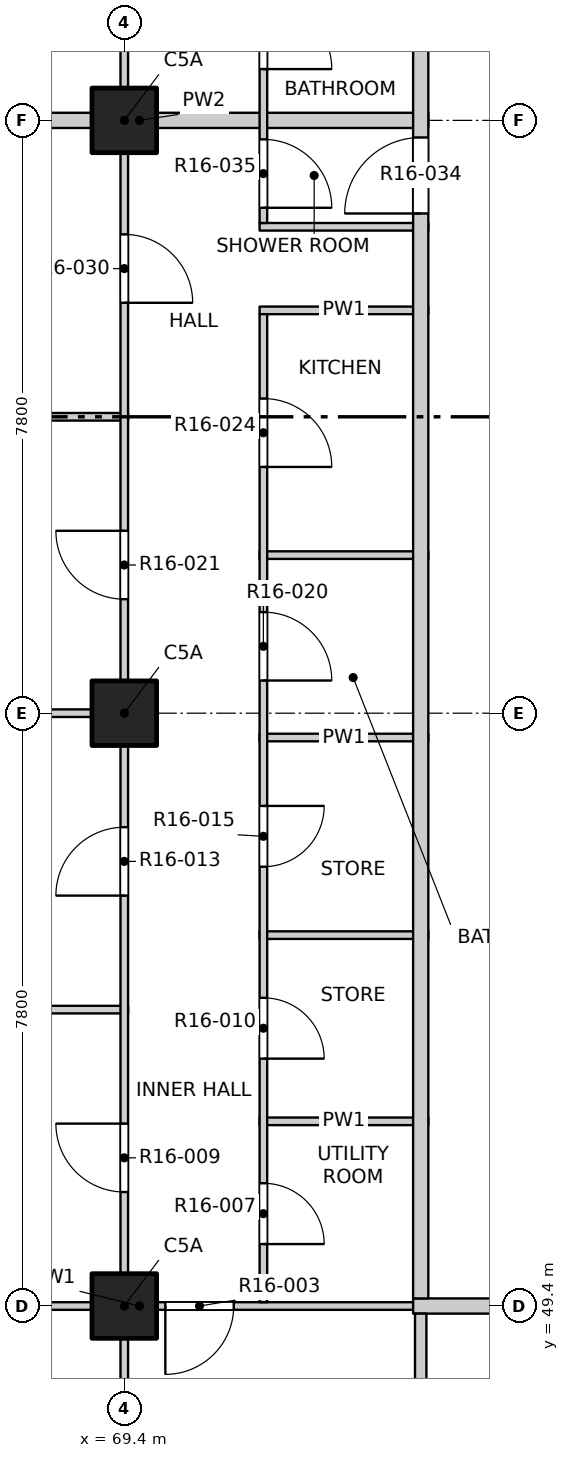
"""IFC4 building model, lengths in metres.
Left out: names, types, materials, properties, quantities, classifications, styles, units other than length and angle.
Written with IfcOpenShell. Run it as: python <this file> out.ifc"""

import sys

from ifc_helpers import new_model, si_unit, direction, frame, frame_2d, origin, origin_2d, place, context, subcontext, project, spatial, rectangle, extrude, element, fill, save


model = new_model("IFC4")
c1 = context("Model", 3, precision=1e-05, world=origin(), true_north=direction((0.0, 1.0)))
c2 = subcontext(c1, "Body", "Model", "MODEL_VIEW")
j1 = project(units=[si_unit("LENGTHUNIT", "METRE"), si_unit("PLANEANGLEUNIT", "RADIAN")], contexts=[c1])
p1 = place(None, origin())
s1 = spatial("IfcSite", under=j1, at=p1, CompositionType="ELEMENT")
p2 = place(p1, origin())
s2 = spatial("IfcBuilding", under=s1, at=p2, CompositionType="ELEMENT")
p3 = place(p2, frame((0.0, 0.0, 169.0)))
s3 = spatial("IfcBuildingStorey", under=s2, at=p3, CompositionType="ELEMENT", Elevation=169.0)
for number, where, z_axis, x_axis in (
    (1, (69.4, 49.4, -0.25), (0.0, 0.0, 1.0), (1.0, 0.0, 0.0)),
    (2, (69.4, 57.2, -0.25), (0.0, 0.0, 1.0), (1.0, 0.0, 0.0)),
    (3, (69.4, 65.0, -0.25), (0.0, 0.0, 1.0), (1.0, 0.0, 0.0)),
):
    element("IfcColumn", number, at=place(p3, frame(where, z_axis=z_axis, x_axis=x_axis)), inside=s3, PredefinedType="COLUMN", context=c2, shape_type="SweptSolid", body=[
        extrude(rectangle(XDim=0.85, YDim=0.85, at=origin_2d()), origin(), (0.0, 0.0, 1.0), 3.35),
    ])
p4 = place(p3, frame((65.8, 49.4, 0.0), z_axis=(0.0, 0.0, 1.0), x_axis=(1.0, 0.0, 0.0)))
e4 = element("IfcWall", 4, at=p4, inside=s3, PredefinedType="PARTITIONING", context=c2, shape_type="SweptSolid", body=[
    extrude(rectangle(XDim=7.6, YDim=0.1, at=frame_2d((3.8, 0.0))), origin(), (0.0, 0.0, 1.0), 3.1),
])
p5 = place(p4, frame((4.14, 0.0, 0.0)))
e5 = element("IfcOpeningElement", 5, at=p5, cuts=e4, PredefinedType="OPENING", context=c2, shape_type="SweptSolid", body=[
    extrude(rectangle(XDim=0.9, YDim=2.1, at=frame_2d((0.45, 1.05))), frame((0.0, 0.06, 0.0), z_axis=(0.0, -1.0, 0.0), x_axis=(1.0, 0.0, 0.0)), (0.0, 0.0, 1.0), 0.12),
])
p6 = place(p3, frame((73.2, 49.4, 0.0), z_axis=(0.0, 0.0, 1.0), x_axis=(1.0, 0.0, 0.0)))
e6 = element("IfcWall", 6, at=p6, inside=s3, PredefinedType="PARTITIONING", context=c2, shape_type="SweptSolid", body=[
    extrude(rectangle(XDim=23.6, YDim=0.2, at=frame_2d((11.8, 0.0))), origin(), (0.0, 0.0, 1.0), 3.1),
])
p7 = place(p6, frame((7.3, 0.0, 0.0)))
e7 = element("IfcOpeningElement", 7, at=p7, cuts=e6, PredefinedType="OPENING", context=c2, shape_type="SweptSolid", body=[
    extrude(rectangle(XDim=1.2, YDim=2.1, at=frame_2d((0.6, 1.05))), frame((0.0, 0.11, 0.0), z_axis=(0.0, -1.0, 0.0), x_axis=(1.0, 0.0, 0.0)), (0.0, 0.0, 1.0), 0.22),
])
p8 = place(p6, frame((20.125, 0.0, 0.0)))
e8 = element("IfcOpeningElement", 8, at=p8, cuts=e6, PredefinedType="OPENING", context=c2, shape_type="SweptSolid", body=[
    extrude(rectangle(XDim=1.2, YDim=2.1, at=frame_2d((0.6, 1.05))), frame((0.0, 0.11, 0.0), z_axis=(0.0, -1.0, 0.0), x_axis=(1.0, 0.0, 0.0)), (0.0, 0.0, 1.0), 0.22),
])
p9 = place(p3, frame((71.18, 51.83, 0.0), z_axis=(0.0, 0.0, 1.0), x_axis=(1.0, 0.0, 0.0)))
e9 = element("IfcWall", 9, at=p9, inside=s3, PredefinedType="PARTITIONING", context=c2, shape_type="SweptSolid", body=[
    extrude(rectangle(XDim=2.22, YDim=0.1, at=frame_2d((1.11, 0.0))), origin(), (0.0, 0.0, 1.0), 3.1),
])
p10 = place(p3, frame((65.8, 53.3, 0.0), z_axis=(0.0, 0.0, 1.0), x_axis=(1.0, 0.0, 0.0)))
e10 = element("IfcWall", 10, at=p10, inside=s3, PredefinedType="PARTITIONING", context=c2, shape_type="SweptSolid", body=[
    extrude(rectangle(XDim=3.65, YDim=0.1, at=frame_2d((1.825, 0.0))), origin(), (0.0, 0.0, 1.0), 3.1),
])
for number, where, z_axis, x_axis in (
    (11, (71.18, 54.28, 0.0), (0.0, 0.0, 1.0), (1.0, 0.0, 0.0)),
    (12, (71.18, 56.88, 0.0), (0.0, 0.0, 1.0), (1.0, 0.0, 0.0)),
):
    element("IfcWall", number, at=place(p3, frame(where, z_axis=z_axis, x_axis=x_axis)), inside=s3, PredefinedType="PARTITIONING", context=c2, shape_type="SweptSolid", body=[
        extrude(rectangle(XDim=2.22, YDim=0.1, at=frame_2d((1.11, 0.0))), origin(), (0.0, 0.0, 1.0), 3.1),
    ])
p11 = place(p3, frame((65.8, 57.2, 0.0), z_axis=(0.0, 0.0, 1.0), x_axis=(1.0, 0.0, 0.0)))
e13 = element("IfcWall", 13, at=p11, inside=s3, PredefinedType="PARTITIONING", context=c2, shape_type="SweptSolid", body=[
    extrude(rectangle(XDim=3.65, YDim=0.1, at=frame_2d((1.825, 0.0))), origin(), (0.0, 0.0, 1.0), 3.1),
])
p12 = place(p3, frame((71.18, 59.28, 0.0), z_axis=(0.0, 0.0, 1.0), x_axis=(1.0, 0.0, 0.0)))
e14 = element("IfcWall", 14, at=p12, inside=s3, PredefinedType="PARTITIONING", context=c2, shape_type="SweptSolid", body=[
    extrude(rectangle(XDim=2.22, YDim=0.1, at=frame_2d((1.11, 0.0))), origin(), (0.0, 0.0, 1.0), 3.1),
])
p13 = place(p3, frame((65.8, 61.1, 0.0), z_axis=(0.0, 0.0, 1.0), x_axis=(1.0, 0.0, 0.0)))
e15 = element("IfcWall", 15, at=p13, inside=s3, PredefinedType="PARTITIONING", context=c2, shape_type="SweptSolid", body=[
    extrude(rectangle(XDim=3.65, YDim=0.1, at=frame_2d((1.825, 0.0))), origin(), (0.0, 0.0, 1.0), 3.1),
])
for number, where, z_axis, x_axis in (
    (16, (71.18, 62.5, 0.0), (0.0, 0.0, 1.0), (1.0, 0.0, 0.0)),
    (17, (71.18, 63.6, 0.0), (0.0, 0.0, 1.0), (1.0, 0.0, 0.0)),
):
    element("IfcWall", number, at=place(p3, frame(where, z_axis=z_axis, x_axis=x_axis)), inside=s3, PredefinedType="PARTITIONING", context=c2, shape_type="SweptSolid", body=[
        extrude(rectangle(XDim=2.22, YDim=0.1, at=frame_2d((1.11, 0.0))), origin(), (0.0, 0.0, 1.0), 3.1),
    ])
p14 = place(p3, frame((65.8, 65.0, 0.0), z_axis=(0.0, 0.0, 1.0), x_axis=(1.0, 0.0, 0.0)))
e18 = element("IfcWall", 18, at=p14, inside=s3, PredefinedType="PARTITIONING", context=c2, shape_type="SweptSolid", body=[
    extrude(rectangle(XDim=7.6, YDim=0.2, at=frame_2d((3.8, 0.0))), origin(), (0.0, 0.0, 1.0), 3.1),
])
p15 = place(p3, frame((69.4, 45.8, 0.0), z_axis=(0.0, 0.0, 1.0), x_axis=(0.0, 1.0, 0.0)))
e19 = element("IfcWall", 19, at=p15, inside=s3, PredefinedType="PARTITIONING", context=c2, shape_type="SweptSolid", body=[
    extrude(rectangle(XDim=38.4, YDim=0.1, at=frame_2d((19.2, 0.0))), origin(), (0.0, 0.0, 1.0), 3.1),
])
p16 = place(p15, frame((1.05, 0.0, 0.0)))
e20 = element("IfcOpeningElement", 20, at=p16, cuts=e19, PredefinedType="OPENING", context=c2, shape_type="SweptSolid", body=[
    extrude(rectangle(XDim=1.2, YDim=2.1, at=frame_2d((0.6, 1.05))), frame((0.0, 0.06, 0.0), z_axis=(0.0, -1.0, 0.0), x_axis=(1.0, 0.0, 0.0)), (0.0, 0.0, 1.0), 0.12),
])
p17 = place(p15, frame((5.1, 0.0, 0.0)))
e21 = element("IfcOpeningElement", 21, at=p17, cuts=e19, PredefinedType="OPENING", context=c2, shape_type="SweptSolid", body=[
    extrude(rectangle(XDim=0.9, YDim=2.1, at=frame_2d((0.45, 1.05))), frame((0.0, 0.06, 0.0), z_axis=(0.0, -1.0, 0.0), x_axis=(1.0, 0.0, 0.0)), (0.0, 0.0, 1.0), 0.12),
])
p18 = place(p15, frame((9.0, 0.0, 0.0)))
e22 = element("IfcOpeningElement", 22, at=p18, cuts=e19, PredefinedType="OPENING", context=c2, shape_type="SweptSolid", body=[
    extrude(rectangle(XDim=0.9, YDim=2.1, at=frame_2d((0.45, 1.05))), frame((0.0, 0.06, 0.0), z_axis=(0.0, -1.0, 0.0), x_axis=(1.0, 0.0, 0.0)), (0.0, 0.0, 1.0), 0.12),
])
p19 = place(p15, frame((12.9, 0.0, 0.0)))
e23 = element("IfcOpeningElement", 23, at=p19, cuts=e19, PredefinedType="OPENING", context=c2, shape_type="SweptSolid", body=[
    extrude(rectangle(XDim=0.9, YDim=2.1, at=frame_2d((0.45, 1.05))), frame((0.0, 0.06, 0.0), z_axis=(0.0, -1.0, 0.0), x_axis=(1.0, 0.0, 0.0)), (0.0, 0.0, 1.0), 0.12),
])
p20 = place(p15, frame((16.8, 0.0, 0.0)))
e24 = element("IfcOpeningElement", 24, at=p20, cuts=e19, PredefinedType="OPENING", context=c2, shape_type="SweptSolid", body=[
    extrude(rectangle(XDim=0.9, YDim=2.1, at=frame_2d((0.45, 1.05))), frame((0.0, 0.06, 0.0), z_axis=(0.0, -1.0, 0.0), x_axis=(1.0, 0.0, 0.0)), (0.0, 0.0, 1.0), 0.12),
])
p21 = place(p15, frame((20.7, 0.0, 0.0)))
e25 = element("IfcOpeningElement", 25, at=p21, cuts=e19, PredefinedType="OPENING", context=c2, shape_type="SweptSolid", body=[
    extrude(rectangle(XDim=0.9, YDim=2.1, at=frame_2d((0.45, 1.05))), frame((0.0, 0.06, 0.0), z_axis=(0.0, -1.0, 0.0), x_axis=(1.0, 0.0, 0.0)), (0.0, 0.0, 1.0), 0.12),
])
p22 = place(p15, frame((24.6, 0.0, 0.0)))
e26 = element("IfcOpeningElement", 26, at=p22, cuts=e19, PredefinedType="OPENING", context=c2, shape_type="SweptSolid", body=[
    extrude(rectangle(XDim=0.9, YDim=2.1, at=frame_2d((0.45, 1.05))), frame((0.0, 0.06, 0.0), z_axis=(0.0, -1.0, 0.0), x_axis=(1.0, 0.0, 0.0)), (0.0, 0.0, 1.0), 0.12),
])
p23 = place(p15, frame((28.5, 0.0, 0.0)))
e27 = element("IfcOpeningElement", 27, at=p23, cuts=e19, PredefinedType="OPENING", context=c2, shape_type="SweptSolid", body=[
    extrude(rectangle(XDim=0.9, YDim=2.1, at=frame_2d((0.45, 1.05))), frame((0.0, 0.06, 0.0), z_axis=(0.0, -1.0, 0.0), x_axis=(1.0, 0.0, 0.0)), (0.0, 0.0, 1.0), 0.12),
])
p24 = place(p15, frame((32.4, 0.0, 0.0)))
e28 = element("IfcOpeningElement", 28, at=p24, cuts=e19, PredefinedType="OPENING", context=c2, shape_type="SweptSolid", body=[
    extrude(rectangle(XDim=0.9, YDim=2.1, at=frame_2d((0.45, 1.05))), frame((0.0, 0.06, 0.0), z_axis=(0.0, -1.0, 0.0), x_axis=(1.0, 0.0, 0.0)), (0.0, 0.0, 1.0), 0.12),
])
p25 = place(p15, frame((36.15, 0.0, 0.0)))
e29 = element("IfcOpeningElement", 29, at=p25, cuts=e19, PredefinedType="OPENING", context=c2, shape_type="SweptSolid", body=[
    extrude(rectangle(XDim=1.2, YDim=2.1, at=frame_2d((0.6, 1.05))), frame((0.0, 0.06, 0.0), z_axis=(0.0, -1.0, 0.0), x_axis=(1.0, 0.0, 0.0)), (0.0, 0.0, 1.0), 0.12),
])
p26 = place(p3, frame((71.23, 49.45, 0.0), z_axis=(0.0, 0.0, 1.0), x_axis=(0.0, 1.0, 0.0)))
e30 = element("IfcWall", 30, at=p26, inside=s3, PredefinedType="PARTITIONING", context=c2, shape_type="SweptSolid", body=[
    extrude(rectangle(XDim=13.0, YDim=0.1, at=frame_2d((6.5, 0.0))), origin(), (0.0, 0.0, 1.0), 3.1),
])
p27 = place(p26, frame((0.765, 0.0, 0.0)))
e31 = element("IfcOpeningElement", 31, at=p27, cuts=e30, PredefinedType="OPENING", context=c2, shape_type="SweptSolid", body=[
    extrude(rectangle(XDim=0.8, YDim=2.1, at=frame_2d((0.4, 1.05))), frame((0.0, 0.06, 0.0), z_axis=(0.0, -1.0, 0.0), x_axis=(1.0, 0.0, 0.0)), (0.0, 0.0, 1.0), 0.12),
])
p28 = place(p26, frame((3.205, 0.0, 0.0)))
e32 = element("IfcOpeningElement", 32, at=p28, cuts=e30, PredefinedType="OPENING", context=c2, shape_type="SweptSolid", body=[
    extrude(rectangle(XDim=0.8, YDim=2.1, at=frame_2d((0.4, 1.05))), frame((0.0, 0.06, 0.0), z_axis=(0.0, -1.0, 0.0), x_axis=(1.0, 0.0, 0.0)), (0.0, 0.0, 1.0), 0.12),
])
p29 = place(p26, frame((5.73, 0.0, 0.0)))
e33 = element("IfcOpeningElement", 33, at=p29, cuts=e30, PredefinedType="OPENING", context=c2, shape_type="SweptSolid", body=[
    extrude(rectangle(XDim=0.8, YDim=2.1, at=frame_2d((0.4, 1.05))), frame((0.0, 0.06, 0.0), z_axis=(0.0, -1.0, 0.0), x_axis=(1.0, 0.0, 0.0)), (0.0, 0.0, 1.0), 0.12),
])
p30 = place(p26, frame((8.18, 0.0, 0.0)))
e34 = element("IfcOpeningElement", 34, at=p30, cuts=e30, PredefinedType="OPENING", context=c2, shape_type="SweptSolid", body=[
    extrude(rectangle(XDim=0.9, YDim=2.1, at=frame_2d((0.45, 1.05))), frame((0.0, 0.06, 0.0), z_axis=(0.0, -1.0, 0.0), x_axis=(1.0, 0.0, 0.0)), (0.0, 0.0, 1.0), 0.12),
])
p31 = place(p26, frame((10.99, 0.0, 0.0)))
e35 = element("IfcOpeningElement", 35, at=p31, cuts=e30, PredefinedType="OPENING", context=c2, shape_type="SweptSolid", body=[
    extrude(rectangle(XDim=0.9, YDim=2.1, at=frame_2d((0.45, 1.05))), frame((0.0, 0.06, 0.0), z_axis=(0.0, -1.0, 0.0), x_axis=(1.0, 0.0, 0.0)), (0.0, 0.0, 1.0), 0.12),
])
p32 = place(p3, frame((71.23, 63.65, 0.0), z_axis=(0.0, 0.0, 1.0), x_axis=(0.0, 1.0, 0.0)))
e36 = element("IfcWall", 36, at=p32, inside=s3, PredefinedType="PARTITIONING", context=c2, shape_type="SweptSolid", body=[
    extrude(rectangle(XDim=6.45, YDim=0.1, at=frame_2d((3.225, 0.0))), origin(), (0.0, 0.0, 1.0), 3.1),
])
p33 = place(p32, frame((0.2, 0.0, 0.0)))
e37 = element("IfcOpeningElement", 37, at=p33, cuts=e36, PredefinedType="OPENING", context=c2, shape_type="SweptSolid", body=[
    extrude(rectangle(XDim=0.9, YDim=2.1, at=frame_2d((0.45, 1.05))), frame((0.0, 0.06, 0.0), z_axis=(0.0, -1.0, 0.0), x_axis=(1.0, 0.0, 0.0)), (0.0, 0.0, 1.0), 0.12),
])
p34 = place(p32, frame((2.025, 0.0, 0.0)))
e38 = element("IfcOpeningElement", 38, at=p34, cuts=e36, PredefinedType="OPENING", context=c2, shape_type="SweptSolid", body=[
    extrude(rectangle(XDim=0.9, YDim=2.1, at=frame_2d((0.45, 1.05))), frame((0.0, 0.06, 0.0), z_axis=(0.0, -1.0, 0.0), x_axis=(1.0, 0.0, 0.0)), (0.0, 0.0, 1.0), 0.12),
])
p35 = place(p32, frame((4.6, 0.0, 0.0)))
e39 = element("IfcOpeningElement", 39, at=p35, cuts=e36, PredefinedType="OPENING", context=c2, shape_type="SweptSolid", body=[
    extrude(rectangle(XDim=0.9, YDim=2.1, at=frame_2d((0.45, 1.05))), frame((0.0, 0.06, 0.0), z_axis=(0.0, -1.0, 0.0), x_axis=(1.0, 0.0, 0.0)), (0.0, 0.0, 1.0), 0.12),
])
p36 = place(p3, frame((73.3, 45.8, 0.0), z_axis=(0.0, 0.0, 1.0), x_axis=(0.0, 1.0, 0.0)))
e40 = element("IfcWall", 40, at=p36, inside=s3, PredefinedType="PARTITIONING", context=c2, shape_type="SweptSolid", body=[
    extrude(rectangle(XDim=3.5, YDim=0.15, at=frame_2d((1.75, 0.0))), origin(), (0.0, 0.0, 1.0), 3.1),
])
p37 = place(p3, frame((73.3, 49.5, 0.0), z_axis=(0.0, 0.0, 1.0), x_axis=(0.0, 1.0, 0.0)))
e41 = element("IfcWall", 41, at=p37, inside=s3, PredefinedType="PARTITIONING", context=c2, shape_type="SweptSolid", body=[
    extrude(rectangle(XDim=34.7, YDim=0.2, at=frame_2d((17.35, 0.0))), origin(), (0.0, 0.0, 1.0), 3.1),
])
p38 = place(p37, frame((14.275, 0.0, 0.0)))
e42 = element("IfcOpeningElement", 42, at=p38, cuts=e41, PredefinedType="OPENING", context=c2, shape_type="SweptSolid", body=[
    extrude(rectangle(XDim=1.0, YDim=2.1, at=frame_2d((0.5, 1.05))), frame((0.0, 0.11, 0.0), z_axis=(0.0, -1.0, 0.0), x_axis=(1.0, 0.0, 0.0)), (0.0, 0.0, 1.0), 0.22),
])
p39 = place(p37, frame((21.925, 0.0, 0.0)))
e43 = element("IfcOpeningElement", 43, at=p39, cuts=e41, PredefinedType="OPENING", context=c2, shape_type="SweptSolid", body=[
    extrude(rectangle(XDim=1.0, YDim=2.1, at=frame_2d((0.5, 1.05))), frame((0.0, 0.11, 0.0), z_axis=(0.0, -1.0, 0.0), x_axis=(1.0, 0.0, 0.0)), (0.0, 0.0, 1.0), 0.22),
])
p40 = place(p37, frame((29.125, 0.0, 0.0)))
e44 = element("IfcOpeningElement", 44, at=p40, cuts=e41, PredefinedType="OPENING", context=c2, shape_type="SweptSolid", body=[
    extrude(rectangle(XDim=1.0, YDim=2.1, at=frame_2d((0.5, 1.05))), frame((0.0, 0.11, 0.0), z_axis=(0.0, -1.0, 0.0), x_axis=(1.0, 0.0, 0.0)), (0.0, 0.0, 1.0), 0.22),
])
p41 = place(p5, origin())
e45 = element("IfcDoor", 45, at=p41, inside=s3, OperationType="SINGLE_SWING_RIGHT", PredefinedType="DOOR", context=c2, shape_type="SweptSolid", body=[
    extrude(rectangle(XDim=0.9, YDim=2.1, at=frame_2d((0.45, 1.05))), frame((0.0, 0.025, 0.0), z_axis=(0.0, -1.0, 0.0), x_axis=(1.0, 0.0, 0.0)), (0.0, 0.0, 1.0), 0.05),
])
fill(e5, e45)
p42 = place(p27, origin())
e46 = element("IfcDoor", 46, at=p42, inside=s3, OperationType="SINGLE_SWING_RIGHT", PredefinedType="DOOR", context=c2, shape_type="SweptSolid", body=[
    extrude(rectangle(XDim=0.8, YDim=2.1, at=frame_2d((0.4, 1.05))), frame((0.0, 0.025, 0.0), z_axis=(0.0, -1.0, 0.0), x_axis=(1.0, 0.0, 0.0)), (0.0, 0.0, 1.0), 0.05),
])
fill(e31, e46)
p43 = place(p17, origin())
e47 = element("IfcDoor", 47, at=p43, inside=s3, OperationType="SINGLE_SWING_RIGHT", PredefinedType="DOOR", context=c2, shape_type="SweptSolid", body=[
    extrude(rectangle(XDim=0.9, YDim=2.1, at=frame_2d((0.45, 1.05))), frame((0.0, 0.025, 0.0), z_axis=(0.0, -1.0, 0.0), x_axis=(1.0, 0.0, 0.0)), (0.0, 0.0, 1.0), 0.05),
])
fill(e21, e47)
p44 = place(p28, origin())
e48 = element("IfcDoor", 48, at=p44, inside=s3, OperationType="SINGLE_SWING_RIGHT", PredefinedType="DOOR", context=c2, shape_type="SweptSolid", body=[
    extrude(rectangle(XDim=0.8, YDim=2.1, at=frame_2d((0.4, 1.05))), frame((0.0, 0.025, 0.0), z_axis=(0.0, -1.0, 0.0), x_axis=(1.0, 0.0, 0.0)), (0.0, 0.0, 1.0), 0.05),
])
fill(e32, e48)
p45 = place(p18, origin())
e49 = element("IfcDoor", 49, at=p45, inside=s3, OperationType="SINGLE_SWING_LEFT", PredefinedType="DOOR", context=c2, shape_type="SweptSolid", body=[
    extrude(rectangle(XDim=0.9, YDim=2.1, at=frame_2d((0.45, 1.05))), frame((0.0, 0.025, 0.0), z_axis=(0.0, -1.0, 0.0), x_axis=(1.0, 0.0, 0.0)), (0.0, 0.0, 1.0), 0.05),
])
fill(e22, e49)
p46 = place(p29, origin())
e50 = element("IfcDoor", 50, at=p46, inside=s3, OperationType="SINGLE_SWING_LEFT", PredefinedType="DOOR", context=c2, shape_type="SweptSolid", body=[
    extrude(rectangle(XDim=0.8, YDim=2.1, at=frame_2d((0.4, 1.05))), frame((0.0, 0.025, 0.0), z_axis=(0.0, -1.0, 0.0), x_axis=(1.0, 0.0, 0.0)), (0.0, 0.0, 1.0), 0.05),
])
fill(e33, e50)
p47 = place(p30, origin())
e51 = element("IfcDoor", 51, at=p47, inside=s3, OperationType="SINGLE_SWING_RIGHT", PredefinedType="DOOR", context=c2, shape_type="SweptSolid", body=[
    extrude(rectangle(XDim=0.9, YDim=2.1, at=frame_2d((0.45, 1.05))), frame((0.0, 0.025, 0.0), z_axis=(0.0, -1.0, 0.0), x_axis=(1.0, 0.0, 0.0)), (0.0, 0.0, 1.0), 0.05),
])
fill(e34, e51)
p48 = place(p19, origin())
e52 = element("IfcDoor", 52, at=p48, inside=s3, OperationType="SINGLE_SWING_RIGHT", PredefinedType="DOOR", context=c2, shape_type="SweptSolid", body=[
    extrude(rectangle(XDim=0.9, YDim=2.1, at=frame_2d((0.45, 1.05))), frame((0.0, 0.025, 0.0), z_axis=(0.0, -1.0, 0.0), x_axis=(1.0, 0.0, 0.0)), (0.0, 0.0, 1.0), 0.05),
])
fill(e23, e52)
p49 = place(p31, origin())
e53 = element("IfcDoor", 53, at=p49, inside=s3, OperationType="SINGLE_SWING_RIGHT", PredefinedType="DOOR", context=c2, shape_type="SweptSolid", body=[
    extrude(rectangle(XDim=0.9, YDim=2.1, at=frame_2d((0.45, 1.05))), frame((0.0, 0.025, 0.0), z_axis=(0.0, -1.0, 0.0), x_axis=(1.0, 0.0, 0.0)), (0.0, 0.0, 1.0), 0.05),
])
fill(e35, e53)
p50 = place(p20, origin())
e54 = element("IfcDoor", 54, at=p50, inside=s3, OperationType="SINGLE_SWING_RIGHT", PredefinedType="DOOR", context=c2, shape_type="SweptSolid", body=[
    extrude(rectangle(XDim=0.9, YDim=2.1, at=frame_2d((0.45, 1.05))), frame((0.0, 0.025, 0.0), z_axis=(0.0, -1.0, 0.0), x_axis=(1.0, 0.0, 0.0)), (0.0, 0.0, 1.0), 0.05),
])
fill(e24, e54)
p51 = place(p38, origin())
e55 = element("IfcDoor", 55, at=p51, inside=s3, OperationType="SINGLE_SWING_RIGHT", PredefinedType="DOOR", context=c2, shape_type="SweptSolid", body=[
    extrude(rectangle(XDim=1.0, YDim=2.1, at=frame_2d((0.5, 1.05))), frame((0.0, 0.025, 0.0), z_axis=(0.0, -1.0, 0.0), x_axis=(1.0, 0.0, 0.0)), (0.0, 0.0, 1.0), 0.05),
])
fill(e42, e55)
p52 = place(p33, origin())
e56 = element("IfcDoor", 56, at=p52, inside=s3, OperationType="SINGLE_SWING_RIGHT", PredefinedType="DOOR", context=c2, shape_type="SweptSolid", body=[
    extrude(rectangle(XDim=0.9, YDim=2.1, at=frame_2d((0.45, 1.05))), frame((0.0, 0.025, 0.0), z_axis=(0.0, -1.0, 0.0), x_axis=(1.0, 0.0, 0.0)), (0.0, 0.0, 1.0), 0.05),
])
fill(e37, e56)
p53 = place(p34, origin())
e57 = element("IfcDoor", 57, at=p53, inside=s3, OperationType="SINGLE_SWING_RIGHT", PredefinedType="DOOR", context=c2, shape_type="SweptSolid", body=[
    extrude(rectangle(XDim=0.9, YDim=2.1, at=frame_2d((0.45, 1.05))), frame((0.0, 0.025, 0.0), z_axis=(0.0, -1.0, 0.0), x_axis=(1.0, 0.0, 0.0)), (0.0, 0.0, 1.0), 0.05),
])
fill(e38, e57)
save(model, sys.argv[1])
